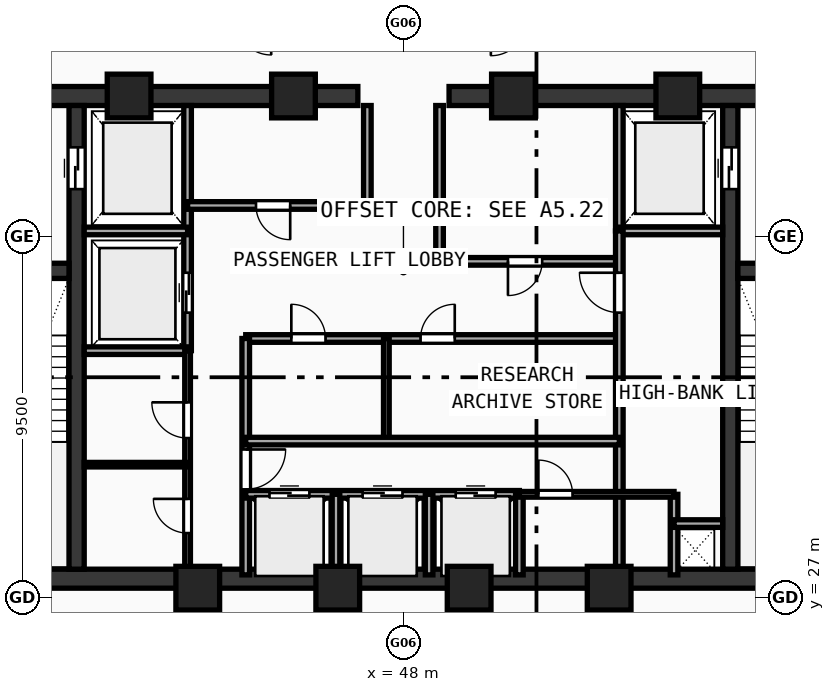
"""IFC4 building model, lengths in metres.
Left out: names, types, materials, properties, quantities, classifications, styles, units other than length and angle.
Written with IfcOpenShell. Run it as: python <this file> out.ifc"""

import sys

from ifc_helpers import new_model, si_unit, direction, frame, frame_2d, origin, origin_with_axes, origin_2d, place, context, subcontext, project, spatial, rectangle, hollow_rectangle, extrude, source, transform, mapped, element, fill, save


model = new_model("IFC4")
c1 = context("Model", 3, precision=1e-05, world=origin(), true_north=direction((0.0, 1.0)))
c2 = subcontext(c1, "Body", "Model", "MODEL_VIEW")
j1 = project(units=[si_unit("LENGTHUNIT", "METRE"), si_unit("PLANEANGLEUNIT", "RADIAN")], contexts=[c1])
p1 = place(None, origin())
s1 = spatial("IfcSite", under=j1, at=p1, CompositionType="ELEMENT")
p2 = place(p1, origin())
s2 = spatial("IfcBuilding", under=s1, at=p2, CompositionType="ELEMENT")
p3 = place(p2, frame((0.0, 0.0, 359.26)))
s3 = spatial("IfcBuildingStorey", under=s2, at=p3, CompositionType="ELEMENT", Elevation=359.26)
p4 = place(p3, frame((35.55, 27.5, 0.0), z_axis=(0.0, 0.0, 1.0), x_axis=(1.0, 0.0, 0.0)))
e1 = element("IfcWall", 1, at=p4, inside=s3, PredefinedType="SHEAR", context=c2, shape_type="SweptSolid", body=[
    extrude(rectangle(XDim=24.9, YDim=0.5, at=frame_2d((12.45, 0.0))), origin(), (0.0, 0.0, 1.0), 3.49),
])
p5 = place(p3, frame((35.55, 40.2, 0.0), z_axis=(0.0, 0.0, 1.0), x_axis=(1.0, 0.0, 0.0)))
e2 = element("IfcWall", 2, at=p5, inside=s3, PredefinedType="SHEAR", context=c2, shape_type="SweptSolid", body=[
    extrude(rectangle(XDim=11.25, YDim=0.5, at=frame_2d((5.625, 0.0))), origin(), (0.0, 0.0, 1.0), 3.49),
])
p6 = place(p5, frame((1.6, 0.0, 0.0)))
e3 = element("IfcOpeningElement", 3, at=p6, cuts=e2, PredefinedType="OPENING", context=c2, shape_type="SweptSolid", body=[
    extrude(rectangle(XDim=1.05, YDim=2.1, at=frame_2d((0.525, 1.05))), frame((0.0, 0.26, 0.0), z_axis=(0.0, -1.0, 0.0), x_axis=(1.0, 0.0, 0.0)), (0.0, 0.0, 1.0), 0.52),
])
p7 = place(p3, frame((49.2, 40.2, 0.0), z_axis=(0.0, 0.0, 1.0), x_axis=(1.0, 0.0, 0.0)))
e4 = element("IfcWall", 4, at=p7, inside=s3, PredefinedType="SHEAR", context=c2, shape_type="SweptSolid", body=[
    extrude(rectangle(XDim=11.25, YDim=0.5, at=frame_2d((5.625, 0.0))), origin(), (0.0, 0.0, 1.0), 3.49),
])
p8 = place(p7, frame((8.6, 0.0, 0.0)))
e5 = element("IfcOpeningElement", 5, at=p8, cuts=e4, PredefinedType="OPENING", context=c2, shape_type="SweptSolid", body=[
    extrude(rectangle(XDim=1.05, YDim=2.1, at=frame_2d((0.525, 1.05))), frame((0.0, 0.26, 0.0), z_axis=(0.0, -1.0, 0.0), x_axis=(1.0, 0.0, 0.0)), (0.0, 0.0, 1.0), 0.52),
])
p9 = place(p3, frame((39.4, 27.75, 0.0), z_axis=(0.0, 0.0, 1.0), x_axis=(0.0, 1.0, 0.0)))
e6 = element("IfcWall", 6, at=p9, inside=s3, PredefinedType="SHEAR", context=c2, shape_type="SweptSolid", body=[
    extrude(rectangle(XDim=12.2, YDim=0.4, at=frame_2d((6.1, 0.0))), origin(), (0.0, 0.0, 1.0), 3.49),
])
p10 = place(p9, frame((10.0, 0.0, 0.0)))
e7 = element("IfcOpeningElement", 7, at=p10, cuts=e6, PredefinedType="OPENING", context=c2, shape_type="SweptSolid", body=[
    extrude(rectangle(XDim=1.1, YDim=2.1, at=frame_2d((0.55, 1.05))), frame((0.0, 0.21, 0.0), z_axis=(0.0, -1.0, 0.0), x_axis=(1.0, 0.0, 0.0)), (0.0, 0.0, 1.0), 0.42),
])
p11 = place(p3, frame((56.6, 27.75, 0.0), z_axis=(0.0, 0.0, 1.0), x_axis=(0.0, 1.0, 0.0)))
e8 = element("IfcWall", 8, at=p11, inside=s3, PredefinedType="SHEAR", context=c2, shape_type="SweptSolid", body=[
    extrude(rectangle(XDim=12.2, YDim=0.4, at=frame_2d((6.1, 0.0))), origin(), (0.0, 0.0, 1.0), 3.49),
])
p12 = place(p11, frame((10.0, 0.0, 0.0)))
e9 = element("IfcOpeningElement", 9, at=p12, cuts=e8, PredefinedType="OPENING", context=c2, shape_type="SweptSolid", body=[
    extrude(rectangle(XDim=1.1, YDim=2.1, at=frame_2d((0.55, 1.05))), frame((0.0, 0.21, 0.0), z_axis=(0.0, -1.0, 0.0), x_axis=(1.0, 0.0, 0.0)), (0.0, 0.0, 1.0), 0.42),
])
p13 = place(p3, frame((36.05, 35.6, 0.0), z_axis=(0.0, 0.0, 1.0), x_axis=(1.0, 0.0, 0.0)))
e10 = element("IfcWall", 10, at=p13, inside=s3, PredefinedType="SHEAR", context=c2, shape_type="SweptSolid", body=[
    extrude(rectangle(XDim=3.15, YDim=0.4, at=frame_2d((1.575, 0.0))), origin(), (0.0, 0.0, 1.0), 3.49),
])
p14 = place(p13, frame((1.07, 0.0, 0.0)))
e11 = element("IfcOpeningElement", 11, at=p14, cuts=e10, PredefinedType="OPENING", context=c2, shape_type="SweptSolid", body=[
    extrude(rectangle(XDim=1.05, YDim=2.1, at=frame_2d((0.525, 1.05))), frame((0.0, 0.21, 0.0), z_axis=(0.0, -1.0, 0.0), x_axis=(1.0, 0.0, 0.0)), (0.0, 0.0, 1.0), 0.42),
])
p15 = place(p3, frame((56.8, 35.6, 0.0), z_axis=(0.0, 0.0, 1.0), x_axis=(1.0, 0.0, 0.0)))
e12 = element("IfcWall", 12, at=p15, inside=s3, PredefinedType="SHEAR", context=c2, shape_type="SweptSolid", body=[
    extrude(rectangle(XDim=3.15, YDim=0.4, at=frame_2d((1.575, 0.0))), origin(), (0.0, 0.0, 1.0), 3.49),
])
p16 = place(p15, frame((1.02, 0.0, 0.0)))
e13 = element("IfcOpeningElement", 13, at=p16, cuts=e12, PredefinedType="OPENING", context=c2, shape_type="SweptSolid", body=[
    extrude(rectangle(XDim=1.05, YDim=2.1, at=frame_2d((0.525, 1.05))), frame((0.0, 0.21, 0.0), z_axis=(0.0, -1.0, 0.0), x_axis=(1.0, 0.0, 0.0)), (0.0, 0.0, 1.0), 0.42),
])
m1 = source(origin(), c2, "Body", "SweptSolid", [
    extrude(hollow_rectangle(XDim=1.15, YDim=1.15, WallThickness=0.048, at=origin_2d()), origin(), (0.0, 0.0, 1.0), 3.75),
])
for number, where, z_axis, x_axis in (
    (14, (42.588, 27.25, -0.26), (0.0, 0.0, 1.0), (1.0, 0.0, 0.0)),
    (15, (46.272, 27.25, -0.26), (0.0, 0.0, 1.0), (1.0, 0.0, 0.0)),
    (16, (49.729, 27.25, -0.26), (0.0, 0.0, 1.0), (1.0, 0.0, 0.0)),
    (17, (53.412, 27.25, -0.26), (0.0, 0.0, 1.0), (1.0, 0.0, 0.0)),
    (18, (55.219, 40.2, -0.26), (0.0, 0.0, 1.0), (1.0, 0.0, 0.0)),
    (19, (50.894, 40.2, -0.26), (0.0, 0.0, 1.0), (1.0, 0.0, 0.0)),
    (20, (45.106, 40.2, -0.26), (0.0, 0.0, 1.0), (1.0, 0.0, 0.0)),
    (21, (40.781, 40.2, -0.26), (0.0, 0.0, 1.0), (1.0, 0.0, 0.0)),
):
    element("IfcColumn", number, at=place(p3, frame(where, z_axis=z_axis, x_axis=x_axis)), inside=s3, PredefinedType="COLUMN", context=c2, shape_type="MappedRepresentation", body=[
        mapped(m1, transform((0.0, 0.0, 0.0), scale=1.0)),
    ])
p17 = place(p3, frame((42.32, 33.5, 0.0), z_axis=(0.0, 0.0, 1.0), x_axis=(0.0, 1.0, 0.0)))
e22 = element("IfcWall", 22, at=p17, inside=s3, PredefinedType="SOLIDWALL", context=c2, shape_type="SweptSolid", body=[
    extrude(rectangle(XDim=6.45, YDim=0.2, at=frame_2d((3.225, 0.0))), origin(), (0.0, 0.0, 1.0), 3.49),
])
p18 = place(p17, frame((1.0, 0.0, 0.0)))
e23 = element("IfcOpeningElement", 23, at=p18, cuts=e22, PredefinedType="OPENING", context=c2, shape_type="SweptSolid", body=[
    extrude(rectangle(XDim=1.05, YDim=2.1, at=frame_2d((0.525, 1.05))), frame((0.0, 0.11, 0.0), z_axis=(0.0, -1.0, 0.0), x_axis=(1.0, 0.0, 0.0)), (0.0, 0.0, 1.0), 0.22),
])
for number, where, z_axis, x_axis in (
    (24, (39.6, 36.65, 0.0), (0.0, 0.0, 1.0), (1.0, 0.0, 0.0)),
    (25, (39.6, 33.5, 0.0), (0.0, 0.0, 1.0), (1.0, 0.0, 0.0)),
):
    element("IfcWall", number, at=place(p3, frame(where, z_axis=z_axis, x_axis=x_axis)), inside=s3, PredefinedType="SOLIDWALL", context=c2, shape_type="SweptSolid", body=[
        extrude(rectangle(XDim=2.72, YDim=0.2, at=frame_2d((1.36, 0.0))), origin(), (0.0, 0.0, 1.0), 3.49),
    ])
p19 = place(p3, frame((53.68, 36.65, 0.0), z_axis=(0.0, 0.0, 1.0), x_axis=(0.0, 1.0, 0.0)))
e26 = element("IfcWall", 26, at=p19, inside=s3, PredefinedType="SOLIDWALL", context=c2, shape_type="SweptSolid", body=[
    extrude(rectangle(XDim=3.3, YDim=0.2, at=frame_2d((1.65, 0.0))), origin(), (0.0, 0.0, 1.0), 3.49),
])
p20 = place(p3, frame((53.68, 36.65, 0.0), z_axis=(0.0, 0.0, 1.0), x_axis=(1.0, 0.0, 0.0)))
e27 = element("IfcWall", 27, at=p20, inside=s3, PredefinedType="SOLIDWALL", context=c2, shape_type="SweptSolid", body=[
    extrude(rectangle(XDim=2.72, YDim=0.2, at=frame_2d((1.36, 0.0))), origin(), (0.0, 0.0, 1.0), 3.49),
])
p21 = place(p3, frame((42.32, 37.32, 0.0), z_axis=(0.0, 0.0, 1.0), x_axis=(1.0, 0.0, 0.0)))
e28 = element("IfcWall", 28, at=p21, inside=s3, PredefinedType="SOLIDWALL", context=c2, shape_type="SweptSolid", body=[
    extrude(rectangle(XDim=4.73, YDim=0.2, at=frame_2d((2.365, 0.0))), origin(), (0.0, 0.0, 1.0), 3.49),
])
p22 = place(p21, frame((1.8, 0.0, 0.0)))
e29 = element("IfcOpeningElement", 29, at=p22, cuts=e28, PredefinedType="OPENING", context=c2, shape_type="SweptSolid", body=[
    extrude(rectangle(XDim=0.9, YDim=2.1, at=frame_2d((0.45, 1.05))), frame((0.0, 0.11, 0.0), z_axis=(0.0, -1.0, 0.0), x_axis=(1.0, 0.0, 0.0)), (0.0, 0.0, 1.0), 0.22),
])
p23 = place(p3, frame((48.95, 35.85, 0.0), z_axis=(0.0, 0.0, 1.0), x_axis=(1.0, 0.0, 0.0)))
e30 = element("IfcWall", 30, at=p23, inside=s3, PredefinedType="SOLIDWALL", context=c2, shape_type="SweptSolid", body=[
    extrude(rectangle(XDim=4.73, YDim=0.2, at=frame_2d((2.365, 0.0))), origin(), (0.0, 0.0, 1.0), 3.49),
])
p24 = place(p23, frame((1.8, 0.0, 0.0)))
e31 = element("IfcOpeningElement", 31, at=p24, cuts=e30, PredefinedType="OPENING", context=c2, shape_type="SweptSolid", body=[
    extrude(rectangle(XDim=0.9, YDim=2.1, at=frame_2d((0.45, 1.05))), frame((0.0, 0.11, 0.0), z_axis=(0.0, -1.0, 0.0), x_axis=(1.0, 0.0, 0.0)), (0.0, 0.0, 1.0), 0.22),
])
p25 = place(p3, frame((47.05, 37.32, 0.0), z_axis=(0.0, 0.0, 1.0), x_axis=(0.0, 1.0, 0.0)))
e32 = element("IfcWall", 32, at=p25, inside=s3, PredefinedType="SOLIDWALL", context=c2, shape_type="SweptSolid", body=[
    extrude(rectangle(XDim=2.63, YDim=0.2, at=frame_2d((1.315, 0.0))), origin(), (0.0, 0.0, 1.0), 3.49),
])
p26 = place(p3, frame((48.95, 35.85, 0.0), z_axis=(0.0, 0.0, 1.0), x_axis=(0.0, 1.0, 0.0)))
e33 = element("IfcWall", 33, at=p26, inside=s3, PredefinedType="SOLIDWALL", context=c2, shape_type="SweptSolid", body=[
    extrude(rectangle(XDim=4.1, YDim=0.2, at=frame_2d((2.05, 0.0))), origin(), (0.0, 0.0, 1.0), 3.49),
])
p27 = place(p3, frame((43.85, 33.82, 0.0), z_axis=(0.0, 0.0, 1.0), x_axis=(1.0, 0.0, 0.0)))
e34 = element("IfcWall", 34, at=p27, inside=s3, PredefinedType="SOLIDWALL", context=c2, shape_type="SweptSolid", body=[
    extrude(rectangle(XDim=9.83, YDim=0.2, at=frame_2d((4.915, 0.0))), origin(), (0.0, 0.0, 1.0), 3.49),
])
p28 = place(p27, frame((1.2, 0.0, 0.0)))
e35 = element("IfcOpeningElement", 35, at=p28, cuts=e34, PredefinedType="OPENING", context=c2, shape_type="SweptSolid", body=[
    extrude(rectangle(XDim=0.9, YDim=2.1, at=frame_2d((0.45, 1.05))), frame((0.0, 0.11, 0.0), z_axis=(0.0, -1.0, 0.0), x_axis=(1.0, 0.0, 0.0)), (0.0, 0.0, 1.0), 0.22),
])
p29 = place(p27, frame((4.6, 0.0, 0.0)))
e36 = element("IfcOpeningElement", 36, at=p29, cuts=e34, PredefinedType="OPENING", context=c2, shape_type="SweptSolid", body=[
    extrude(rectangle(XDim=0.9, YDim=2.1, at=frame_2d((0.45, 1.05))), frame((0.0, 0.11, 0.0), z_axis=(0.0, -1.0, 0.0), x_axis=(1.0, 0.0, 0.0)), (0.0, 0.0, 1.0), 0.22),
])
p30 = place(p3, frame((43.85, 27.6, 0.0), z_axis=(0.0, 0.0, 1.0), x_axis=(0.0, 1.0, 0.0)))
e37 = element("IfcWall", 37, at=p30, inside=s3, PredefinedType="SOLIDWALL", context=c2, shape_type="SweptSolid", body=[
    extrude(rectangle(XDim=6.22, YDim=0.2, at=frame_2d((3.11, 0.0))), origin(), (0.0, 0.0, 1.0), 3.49),
])
p31 = place(p30, frame((2.25, 0.0, 0.0)))
e38 = element("IfcOpeningElement", 38, at=p31, cuts=e37, PredefinedType="OPENING", context=c2, shape_type="SweptSolid", body=[
    extrude(rectangle(XDim=1.05, YDim=2.1, at=frame_2d((0.525, 1.05))), frame((0.0, 0.11, 0.0), z_axis=(0.0, -1.0, 0.0), x_axis=(1.0, 0.0, 0.0)), (0.0, 0.0, 1.0), 0.22),
])
p32 = place(p3, frame((53.68, 27.6, 0.0), z_axis=(0.0, 0.0, 1.0), x_axis=(0.0, 1.0, 0.0)))
e39 = element("IfcWall", 39, at=p32, inside=s3, PredefinedType="SOLIDWALL", context=c2, shape_type="SweptSolid", body=[
    extrude(rectangle(XDim=9.05, YDim=0.2, at=frame_2d((4.525, 0.0))), origin(), (0.0, 0.0, 1.0), 3.49),
])
p33 = place(p32, frame((6.9, 0.0, 0.0)))
e40 = element("IfcOpeningElement", 40, at=p33, cuts=e39, PredefinedType="OPENING", context=c2, shape_type="SweptSolid", body=[
    extrude(rectangle(XDim=1.05, YDim=2.1, at=frame_2d((0.525, 1.05))), frame((0.0, 0.11, 0.0), z_axis=(0.0, -1.0, 0.0), x_axis=(1.0, 0.0, 0.0)), (0.0, 0.0, 1.0), 0.22),
])
p34 = place(p3, frame((47.55, 31.12, 0.0), z_axis=(0.0, 0.0, 1.0), x_axis=(0.0, 1.0, 0.0)))
e41 = element("IfcWall", 41, at=p34, inside=s3, PredefinedType="PARTITIONING", context=c2, shape_type="SweptSolid", body=[
    extrude(rectangle(XDim=2.7, YDim=0.15, at=frame_2d((1.35, 0.0))), origin(), (0.0, 0.0, 1.0), 3.49),
])
p35 = place(p3, frame((43.85, 29.72, 0.0), z_axis=(0.0, 0.0, 1.0), x_axis=(1.0, 0.0, 0.0)))
e42 = element("IfcWall", 42, at=p35, inside=s3, PredefinedType="SOLIDWALL", context=c2, shape_type="SweptSolid", body=[
    extrude(rectangle(XDim=7.2, YDim=0.2, at=frame_2d((3.6, 0.0))), origin(), (0.0, 0.0, 1.0), 3.49),
])
p36 = place(p35, frame((0.625, 0.0, 0.0)))
e43 = element("IfcOpeningElement", 43, at=p36, cuts=e42, PredefinedType="OPENING", context=c2, shape_type="SweptSolid", body=[
    extrude(rectangle(XDim=1.05, YDim=2.1, at=frame_2d((0.525, 1.05))), frame((0.0, 0.11, 0.0), z_axis=(0.0, -1.0, 0.0), x_axis=(1.0, 0.0, 0.0)), (0.0, 0.0, 1.0), 0.22),
])
p37 = place(p35, frame((3.075, 0.0, 0.0)))
e44 = element("IfcOpeningElement", 44, at=p37, cuts=e42, PredefinedType="OPENING", context=c2, shape_type="SweptSolid", body=[
    extrude(rectangle(XDim=1.05, YDim=2.1, at=frame_2d((0.525, 1.05))), frame((0.0, 0.11, 0.0), z_axis=(0.0, -1.0, 0.0), x_axis=(1.0, 0.0, 0.0)), (0.0, 0.0, 1.0), 0.22),
])
p38 = place(p35, frame((5.525, 0.0, 0.0)))
e45 = element("IfcOpeningElement", 45, at=p38, cuts=e42, PredefinedType="OPENING", context=c2, shape_type="SweptSolid", body=[
    extrude(rectangle(XDim=1.05, YDim=2.1, at=frame_2d((0.525, 1.05))), frame((0.0, 0.11, 0.0), z_axis=(0.0, -1.0, 0.0), x_axis=(1.0, 0.0, 0.0)), (0.0, 0.0, 1.0), 0.22),
])
p39 = place(p3, frame((51.05, 27.6, 0.0), z_axis=(0.0, 0.0, 1.0), x_axis=(0.0, 1.0, 0.0)))
e46 = element("IfcWall", 46, at=p39, inside=s3, PredefinedType="SOLIDWALL", context=c2, shape_type="SweptSolid", body=[
    extrude(rectangle(XDim=2.12, YDim=0.2, at=frame_2d((1.06, 0.0))), origin(), (0.0, 0.0, 1.0), 3.49),
])
p40 = place(p3, frame((43.85, 31.12, 0.0), z_axis=(0.0, 0.0, 1.0), x_axis=(1.0, 0.0, 0.0)))
e47 = element("IfcWall", 47, at=p40, inside=s3, PredefinedType="SOLIDWALL", context=c2, shape_type="SweptSolid", body=[
    extrude(rectangle(XDim=9.83, YDim=0.2, at=frame_2d((4.915, 0.0))), origin(), (0.0, 0.0, 1.0), 3.49),
])
for number, where, z_axis, x_axis in (
    (48, (46.225, 27.6, 0.0), (0.0, 0.0, 1.0), (0.0, 1.0, 0.0)),
    (49, (48.675, 27.6, 0.0), (0.0, 0.0, 1.0), (0.0, 1.0, 0.0)),
    (50, (55.12, 27.6, 0.0), (0.0, 0.0, 1.0), (0.0, 1.0, 0.0)),
):
    element("IfcWall", number, at=place(p3, frame(where, z_axis=z_axis, x_axis=x_axis)), inside=s3, PredefinedType="SOLIDWALL", context=c2, shape_type="SweptSolid", body=[
        extrude(rectangle(XDim=2.12, YDim=0.2, at=frame_2d((1.06, 0.0))), origin(), (0.0, 0.0, 1.0), 3.49),
    ])
p41 = place(p3, frame((55.12, 28.95, 0.0), z_axis=(0.0, 0.0, 1.0), x_axis=(1.0, 0.0, 0.0)))
e51 = element("IfcWall", 51, at=p41, inside=s3, PredefinedType="SOLIDWALL", context=c2, shape_type="SweptSolid", body=[
    extrude(rectangle(XDim=1.28, YDim=0.2, at=frame_2d((0.64, 0.0))), origin(), (0.0, 0.0, 1.0), 3.49),
])
p42 = place(p3, frame((42.32, 27.6, 0.0), z_axis=(0.0, 0.0, 1.0), x_axis=(0.0, 1.0, 0.0)))
e52 = element("IfcWall", 52, at=p42, inside=s3, PredefinedType="PARTITIONING", context=c2, shape_type="SweptSolid", body=[
    extrude(rectangle(XDim=5.9, YDim=0.15, at=frame_2d((2.95, 0.0))), origin(), (0.0, 0.0, 1.0), 3.49),
])
p43 = place(p42, frame((1.1, 0.0, 0.0)))
e53 = element("IfcOpeningElement", 53, at=p43, cuts=e52, PredefinedType="OPENING", context=c2, shape_type="SweptSolid", body=[
    extrude(rectangle(XDim=0.9, YDim=2.1, at=frame_2d((0.45, 1.05))), frame((0.0, 0.085, 0.0), z_axis=(0.0, -1.0, 0.0), x_axis=(1.0, 0.0, 0.0)), (0.0, 0.0, 1.0), 0.17),
])
p44 = place(p42, frame((3.6, 0.0, 0.0)))
e54 = element("IfcOpeningElement", 54, at=p44, cuts=e52, PredefinedType="OPENING", context=c2, shape_type="SweptSolid", body=[
    extrude(rectangle(XDim=0.94, YDim=2.1, at=frame_2d((0.47, 1.05))), frame((0.0, 0.085, 0.0), z_axis=(0.0, -1.0, 0.0), x_axis=(1.0, 0.0, 0.0)), (0.0, 0.0, 1.0), 0.17),
])
p45 = place(p3, frame((51.05, 29.72, 0.0), z_axis=(0.0, 0.0, 1.0), x_axis=(1.0, 0.0, 0.0)))
e55 = element("IfcWall", 55, at=p45, inside=s3, PredefinedType="PARTITIONING", context=c2, shape_type="SweptSolid", body=[
    extrude(rectangle(XDim=4.07, YDim=0.15, at=frame_2d((2.035, 0.0))), origin(), (0.0, 0.0, 1.0), 3.49),
])
p46 = place(p45, frame((0.5, 0.0, 0.0)))
e56 = element("IfcOpeningElement", 56, at=p46, cuts=e55, PredefinedType="OPENING", context=c2, shape_type="SweptSolid", body=[
    extrude(rectangle(XDim=0.9, YDim=2.1, at=frame_2d((0.45, 1.05))), frame((0.0, 0.085, 0.0), z_axis=(0.0, -1.0, 0.0), x_axis=(1.0, 0.0, 0.0)), (0.0, 0.0, 1.0), 0.17),
])
p47 = place(p3, frame((39.6, 30.5, 0.0), z_axis=(0.0, 0.0, 1.0), x_axis=(1.0, 0.0, 0.0)))
e57 = element("IfcWall", 57, at=p47, inside=s3, PredefinedType="PARTITIONING", context=c2, shape_type="SweptSolid", body=[
    extrude(rectangle(XDim=2.72, YDim=0.12, at=frame_2d((1.36, 0.0))), origin(), (0.0, 0.0, 1.0), 3.49),
])
m2 = source(origin(), c2, "Body", "SweptSolid", [
    extrude(rectangle(XDim=1.1, YDim=2.1, at=frame_2d((0.55, 1.05))), frame((0.0, 0.025, 0.0), z_axis=(0.0, -1.0, 0.0), x_axis=(1.0, 0.0, 0.0)), (0.0, 0.0, 1.0), 0.05),
])
p48 = place(p10, frame((1.1, 0.0, 0.0), z_axis=(0.0, 0.0, 1.0), x_axis=(-1.0, 0.0, 0.0)))
e58 = element("IfcDoor", 58, at=p48, inside=s3, OperationType="DOUBLE_DOOR_SLIDING", PredefinedType="DOOR", context=c2, shape_type="MappedRepresentation", body=[
    mapped(m2, transform((0.0, 0.0, 0.0), scale=1.0)),
])
fill(e7, e58)
p49 = place(p12, origin_with_axes())
e59 = element("IfcDoor", 59, at=p49, inside=s3, OperationType="DOUBLE_DOOR_SLIDING", PredefinedType="DOOR", context=c2, shape_type="MappedRepresentation", body=[
    mapped(m2, transform((0.0, 0.0, 0.0), scale=1.0)),
])
fill(e9, e59)
m3 = source(origin(), c2, "Body", "SweptSolid", [
    extrude(rectangle(XDim=1.05, YDim=2.1, at=frame_2d((0.525, 1.05))), frame((0.0, 0.025, 0.0), z_axis=(0.0, -1.0, 0.0), x_axis=(1.0, 0.0, 0.0)), (0.0, 0.0, 1.0), 0.05),
])
p50 = place(p18, origin_with_axes())
e60 = element("IfcDoor", 60, at=p50, inside=s3, OperationType="DOUBLE_DOOR_SLIDING", PredefinedType="DOOR", context=c2, shape_type="MappedRepresentation", body=[
    mapped(m3, transform((0.0, 0.0, 0.0), scale=1.0)),
])
fill(e23, e60)
m4 = source(origin(), c2, "Body", "SweptSolid", [
    extrude(rectangle(XDim=0.9, YDim=2.1, at=frame_2d((0.45, 1.05))), frame((0.0, 0.025, 0.0), z_axis=(0.0, -1.0, 0.0), x_axis=(1.0, 0.0, 0.0)), (0.0, 0.0, 1.0), 0.05),
])
p51 = place(p22, frame((0.9, 0.0, 0.0), z_axis=(0.0, 0.0, 1.0), x_axis=(-1.0, 0.0, 0.0)))
e61 = element("IfcDoor", 61, at=p51, inside=s3, OperationType="SINGLE_SWING_LEFT", PredefinedType="DOOR", context=c2, shape_type="MappedRepresentation", body=[
    mapped(m4, transform((0.0, 0.0, 0.0), scale=1.0)),
])
fill(e29, e61)
p52 = place(p24, frame((0.9, 0.0, 0.0), z_axis=(0.0, 0.0, 1.0), x_axis=(-1.0, 0.0, 0.0)))
e62 = element("IfcDoor", 62, at=p52, inside=s3, OperationType="SINGLE_SWING_RIGHT", PredefinedType="DOOR", context=c2, shape_type="MappedRepresentation", body=[
    mapped(m4, transform((0.0, 0.0, 0.0), scale=1.0)),
])
fill(e31, e62)
p53 = place(p28, origin_with_axes())
e63 = element("IfcDoor", 63, at=p53, inside=s3, OperationType="SINGLE_SWING_LEFT", PredefinedType="DOOR", context=c2, shape_type="MappedRepresentation", body=[
    mapped(m4, transform((0.0, 0.0, 0.0), scale=1.0)),
])
fill(e35, e63)
p54 = place(p29, origin_with_axes())
e64 = element("IfcDoor", 64, at=p54, inside=s3, OperationType="SINGLE_SWING_RIGHT", PredefinedType="DOOR", context=c2, shape_type="MappedRepresentation", body=[
    mapped(m4, transform((0.0, 0.0, 0.0), scale=1.0)),
])
fill(e36, e64)
p55 = place(p31, frame((1.05, 0.0, 0.0), z_axis=(0.0, 0.0, 1.0), x_axis=(-1.0, 0.0, 0.0)))
e65 = element("IfcDoor", 65, at=p55, inside=s3, OperationType="SINGLE_SWING_LEFT", PredefinedType="DOOR", context=c2, shape_type="MappedRepresentation", body=[
    mapped(m3, transform((0.0, 0.0, 0.0), scale=1.0)),
])
fill(e38, e65)
p56 = place(p33, origin_with_axes())
e66 = element("IfcDoor", 66, at=p56, inside=s3, OperationType="SINGLE_SWING_RIGHT", PredefinedType="DOOR", context=c2, shape_type="MappedRepresentation", body=[
    mapped(m3, transform((0.0, 0.0, 0.0), scale=1.0)),
])
fill(e40, e66)
p57 = place(p36, origin_with_axes())
e67 = element("IfcDoor", 67, at=p57, inside=s3, OperationType="DOUBLE_DOOR_SLIDING", PredefinedType="DOOR", context=c2, shape_type="MappedRepresentation", body=[
    mapped(m3, transform((0.0, 0.0, 0.0), scale=1.0)),
])
fill(e43, e67)
p58 = place(p37, origin_with_axes())
e68 = element("IfcDoor", 68, at=p58, inside=s3, OperationType="DOUBLE_DOOR_SLIDING", PredefinedType="DOOR", context=c2, shape_type="MappedRepresentation", body=[
    mapped(m3, transform((0.0, 0.0, 0.0), scale=1.0)),
])
fill(e44, e68)
p59 = place(p38, origin_with_axes())
e69 = element("IfcDoor", 69, at=p59, inside=s3, OperationType="DOUBLE_DOOR_SLIDING", PredefinedType="DOOR", context=c2, shape_type="MappedRepresentation", body=[
    mapped(m3, transform((0.0, 0.0, 0.0), scale=1.0)),
])
fill(e45, e69)
p60 = place(p43, origin_with_axes())
e70 = element("IfcDoor", 70, at=p60, inside=s3, OperationType="SINGLE_SWING_RIGHT", PredefinedType="DOOR", context=c2, shape_type="MappedRepresentation", body=[
    mapped(m4, transform((0.0, 0.0, 0.0), scale=1.0)),
])
fill(e53, e70)
m5 = source(origin(), c2, "Body", "SweptSolid", [
    extrude(rectangle(XDim=0.94, YDim=2.1, at=frame_2d((0.47, 1.05))), frame((0.0, 0.025, 0.0), z_axis=(0.0, -1.0, 0.0), x_axis=(1.0, 0.0, 0.0)), (0.0, 0.0, 1.0), 0.05),
])
p61 = place(p44, origin_with_axes())
e71 = element("IfcDoor", 71, at=p61, inside=s3, OperationType="SINGLE_SWING_RIGHT", PredefinedType="DOOR", context=c2, shape_type="MappedRepresentation", body=[
    mapped(m5, transform((0.0, 0.0, 0.0), scale=1.0)),
])
fill(e54, e71)
p62 = place(p46, origin_with_axes())
e72 = element("IfcDoor", 72, at=p62, inside=s3, OperationType="SINGLE_SWING_LEFT", PredefinedType="DOOR", context=c2, shape_type="MappedRepresentation", body=[
    mapped(m4, transform((0.0, 0.0, 0.0), scale=1.0)),
])
fill(e56, e72)
save(model, sys.argv[1])
